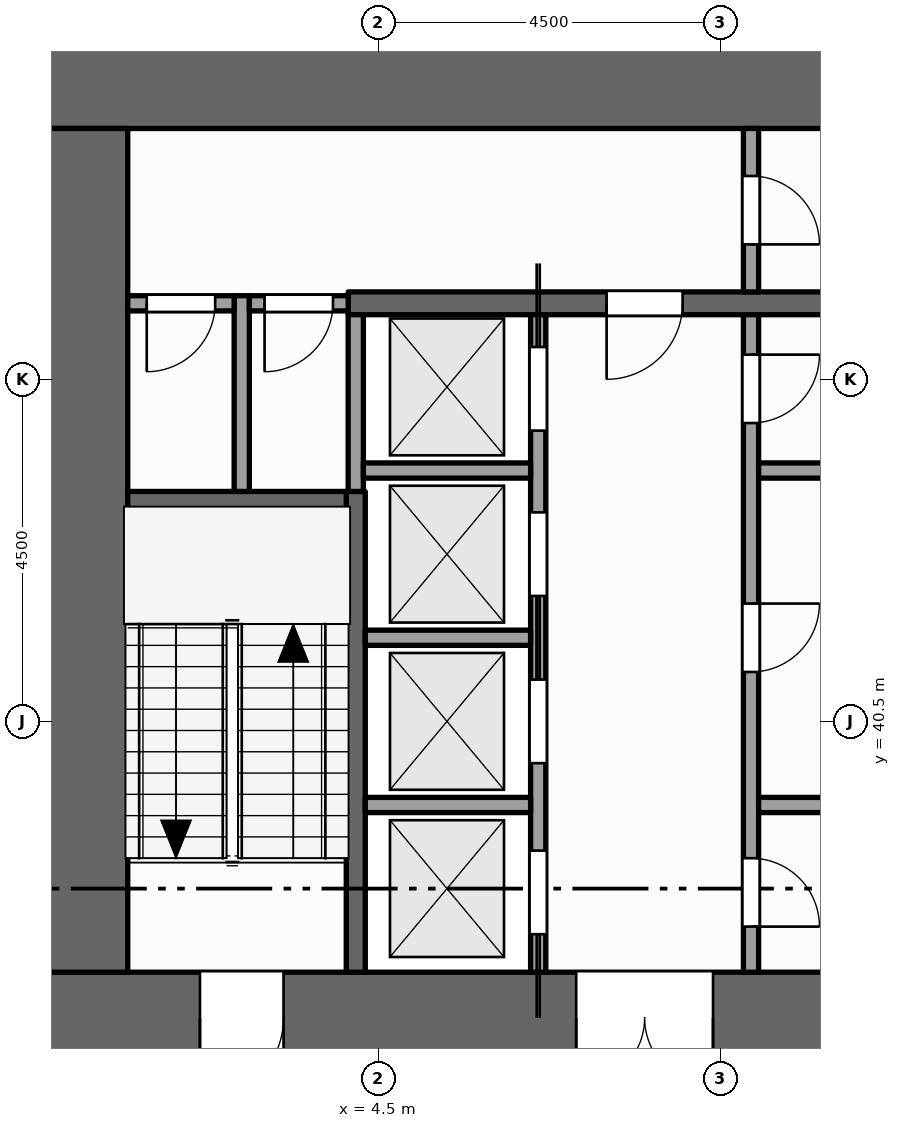
"""IFC4 building model, lengths in metres.
Left out: names, types, materials, properties, quantities, classifications, styles, units other than length and angle.
Written with IfcOpenShell. Run it as: python <this file> out.ifc"""

import sys

from ifc_helpers import new_model, si_unit, direction, frame, frame_2d, origin, place, context, subcontext, project, spatial, rectangle, extrude, element, fill, save


model = new_model("IFC4")
c1 = context("Model", 3, precision=1e-05, world=origin(), true_north=direction((0.0, 1.0)))
c2 = subcontext(c1, "Body", "Model", "MODEL_VIEW")
j1 = project(units=[si_unit("LENGTHUNIT", "METRE"), si_unit("PLANEANGLEUNIT", "RADIAN")], contexts=[c1])
p1 = place(None, origin())
s1 = spatial("IfcSite", under=j1, at=p1, CompositionType="ELEMENT")
p2 = place(p1, origin())
s2 = spatial("IfcBuilding", under=s1, at=p2, CompositionType="ELEMENT")
p3 = place(p2, frame((0.0, 0.0, 95.0)))
s3 = spatial("IfcBuildingStorey", under=s2, at=p3, CompositionType="ELEMENT", Elevation=95.0)
p4 = place(p3, frame((0.0, 36.6, -0.15), z_axis=(0.0, 0.0, 1.0), x_axis=(1.0, 0.0, 0.0)))
e1 = element("IfcWall", 1, at=p4, inside=s3, PredefinedType="SHEAR", context=c2, shape_type="SweptSolid", body=[
    extrude(rectangle(XDim=22.5, YDim=1.2, at=frame_2d((11.25, 0.0))), origin(), (0.0, 0.0, 1.0), 4.0),
])
p5 = place(p4, frame((7.1, 0.0, 0.15)))
e2 = element("IfcOpeningElement", 2, at=p5, cuts=e1, PredefinedType="OPENING", context=c2, shape_type="SweptSolid", body=[
    extrude(rectangle(XDim=1.8, YDim=2.1, at=frame_2d((0.9, 1.05))), frame((0.0, 0.61, 0.0), z_axis=(0.0, -1.0, 0.0), x_axis=(1.0, 0.0, 0.0)), (0.0, 0.0, 1.0), 1.22),
])
p6 = place(p4, frame((13.15, 0.0, 0.15)))
e3 = element("IfcOpeningElement", 3, at=p6, cuts=e1, PredefinedType="OPENING", context=c2, shape_type="SweptSolid", body=[
    extrude(rectangle(XDim=1.1, YDim=2.1, at=frame_2d((0.55, 1.05))), frame((0.0, 0.61, 0.0), z_axis=(0.0, -1.0, 0.0), x_axis=(1.0, 0.0, 0.0)), (0.0, 0.0, 1.0), 1.22),
])
p7 = place(p4, frame((2.15, 0.0, 0.15)))
e4 = element("IfcOpeningElement", 4, at=p7, cuts=e1, PredefinedType="OPENING", context=c2, shape_type="SweptSolid", body=[
    extrude(rectangle(XDim=1.1, YDim=2.1, at=frame_2d((0.55, 1.05))), frame((0.0, 0.61, 0.0), z_axis=(0.0, -1.0, 0.0), x_axis=(1.0, 0.0, 0.0)), (0.0, 0.0, 1.0), 1.22),
])
p8 = place(p4, frame((19.35, 0.0, 0.15)))
e5 = element("IfcOpeningElement", 5, at=p8, cuts=e1, PredefinedType="OPENING", context=c2, shape_type="SweptSolid", body=[
    extrude(rectangle(XDim=1.1, YDim=2.1, at=frame_2d((0.55, 1.05))), frame((0.0, 0.61, 0.0), z_axis=(0.0, -1.0, 0.0), x_axis=(1.0, 0.0, 0.0)), (0.0, 0.0, 1.0), 1.22),
])
p9 = place(p3, frame((0.0, 48.9, -0.15), z_axis=(0.0, 0.0, 1.0), x_axis=(1.0, 0.0, 0.0)))
e6 = element("IfcWall", 6, at=p9, inside=s3, PredefinedType="SHEAR", context=c2, shape_type="SweptSolid", body=[
    extrude(rectangle(XDim=22.5, YDim=1.2, at=frame_2d((11.25, 0.0))), origin(), (0.0, 0.0, 1.0), 4.0),
])
p10 = place(p3, frame((0.6, 37.2, -0.15), z_axis=(0.0, 0.0, 1.0), x_axis=(0.0, 1.0, 0.0)))
e7 = element("IfcWall", 7, at=p10, inside=s3, PredefinedType="SHEAR", context=c2, shape_type="SweptSolid", body=[
    extrude(rectangle(XDim=11.1, YDim=1.2, at=frame_2d((5.55, 0.0))), origin(), (0.0, 0.0, 1.0), 4.0),
])
p11 = place(p3, frame((2.7, 43.525, 0.0), z_axis=(0.0, 0.0, 1.0), x_axis=(0.0, 1.0, 0.0)))
e8 = element("IfcWall", 8, at=p11, inside=s3, PredefinedType="PARTITIONING", context=c2, shape_type="SweptSolid", body=[
    extrude(rectangle(XDim=2.575, YDim=0.2, at=frame_2d((1.288, 0.0))), origin(), (0.0, 0.0, 1.0), 3.85),
])
p12 = place(p3, frame((4.2, 37.2, 0.0), z_axis=(0.0, 0.0, 1.0), x_axis=(0.0, 1.0, 0.0)))
e9 = element("IfcWall", 9, at=p12, inside=s3, PredefinedType="SHEAR", context=c2, shape_type="SweptSolid", body=[
    extrude(rectangle(XDim=6.325, YDim=0.25, at=frame_2d((3.163, 0.0))), origin(), (0.0, 0.0, 1.0), 3.85),
])
p13 = place(p3, frame((4.2, 43.525, 0.0), z_axis=(0.0, 0.0, 1.0), x_axis=(0.0, 1.0, 0.0)))
e10 = element("IfcWall", 10, at=p13, inside=s3, PredefinedType="SOLIDWALL", context=c2, shape_type="SweptSolid", body=[
    extrude(rectangle(XDim=2.325, YDim=0.2, at=frame_2d((1.163, 0.0))), origin(), (0.0, 0.0, 1.0), 3.85),
])
p14 = place(p3, frame((6.6, 37.2, 0.0), z_axis=(0.0, 0.0, 1.0), x_axis=(0.0, 1.0, 0.0)))
e11 = element("IfcWall", 11, at=p14, inside=s3, PredefinedType="SOLIDWALL", context=c2, shape_type="SweptSolid", body=[
    extrude(rectangle(XDim=8.65, YDim=0.2, at=frame_2d((4.325, 0.0))), origin(), (0.0, 0.0, 1.0), 3.85),
])
p15 = place(p14, frame((0.5, 0.0, 0.012)))
e12 = element("IfcOpeningElement", 12, at=p15, cuts=e11, PredefinedType="OPENING", context=c2, shape_type="SweptSolid", body=[
    extrude(rectangle(XDim=1.1, YDim=2.1, at=frame_2d((0.55, 1.05))), frame((0.0, 0.11, 0.0), z_axis=(0.0, -1.0, 0.0), x_axis=(1.0, 0.0, 0.0)), (0.0, 0.0, 1.0), 0.22),
])
p16 = place(p14, frame((2.75, 0.0, 0.012)))
e13 = element("IfcOpeningElement", 13, at=p16, cuts=e11, PredefinedType="OPENING", context=c2, shape_type="SweptSolid", body=[
    extrude(rectangle(XDim=1.1, YDim=2.1, at=frame_2d((0.55, 1.05))), frame((0.0, 0.11, 0.0), z_axis=(0.0, -1.0, 0.0), x_axis=(1.0, 0.0, 0.0)), (0.0, 0.0, 1.0), 0.22),
])
p17 = place(p14, frame((4.95, 0.0, 0.012)))
e14 = element("IfcOpeningElement", 14, at=p17, cuts=e11, PredefinedType="OPENING", context=c2, shape_type="SweptSolid", body=[
    extrude(rectangle(XDim=1.1, YDim=2.1, at=frame_2d((0.55, 1.05))), frame((0.0, 0.11, 0.0), z_axis=(0.0, -1.0, 0.0), x_axis=(1.0, 0.0, 0.0)), (0.0, 0.0, 1.0), 0.22),
])
p18 = place(p14, frame((7.125, 0.0, 0.012)))
e15 = element("IfcOpeningElement", 15, at=p18, cuts=e11, PredefinedType="OPENING", context=c2, shape_type="SweptSolid", body=[
    extrude(rectangle(XDim=1.1, YDim=2.1, at=frame_2d((0.55, 1.05))), frame((0.0, 0.11, 0.0), z_axis=(0.0, -1.0, 0.0), x_axis=(1.0, 0.0, 0.0)), (0.0, 0.0, 1.0), 0.22),
])
p19 = place(p3, frame((9.4, 37.2, 0.0), z_axis=(0.0, 0.0, 1.0), x_axis=(0.0, 1.0, 0.0)))
e16 = element("IfcWall", 16, at=p19, inside=s3, PredefinedType="PARTITIONING", context=c2, shape_type="SweptSolid", body=[
    extrude(rectangle(XDim=8.65, YDim=0.2, at=frame_2d((4.325, 0.0))), origin(), (0.0, 0.0, 1.0), 3.85),
])
p20 = place(p19, frame((0.6, 0.0, 0.0)))
e17 = element("IfcOpeningElement", 17, at=p20, cuts=e16, PredefinedType="OPENING", context=c2, shape_type="SweptSolid", body=[
    extrude(rectangle(XDim=0.9, YDim=2.1, at=frame_2d((0.45, 1.05))), frame((0.0, 0.11, 0.0), z_axis=(0.0, -1.0, 0.0), x_axis=(1.0, 0.0, 0.0)), (0.0, 0.0, 1.0), 0.22),
])
p21 = place(p19, frame((3.95, 0.0, 0.0)))
e18 = element("IfcOpeningElement", 18, at=p21, cuts=e16, PredefinedType="OPENING", context=c2, shape_type="SweptSolid", body=[
    extrude(rectangle(XDim=0.9, YDim=2.1, at=frame_2d((0.45, 1.05))), frame((0.0, 0.11, 0.0), z_axis=(0.0, -1.0, 0.0), x_axis=(1.0, 0.0, 0.0)), (0.0, 0.0, 1.0), 0.22),
])
p22 = place(p19, frame((7.225, 0.0, 0.0)))
e19 = element("IfcOpeningElement", 19, at=p22, cuts=e16, PredefinedType="OPENING", context=c2, shape_type="SweptSolid", body=[
    extrude(rectangle(XDim=0.9, YDim=2.1, at=frame_2d((0.45, 1.05))), frame((0.0, 0.11, 0.0), z_axis=(0.0, -1.0, 0.0), x_axis=(1.0, 0.0, 0.0)), (0.0, 0.0, 1.0), 0.22),
])
p23 = place(p3, frame((9.4, 46.15, 0.0), z_axis=(0.0, 0.0, 1.0), x_axis=(0.0, 1.0, 0.0)))
e20 = element("IfcWall", 20, at=p23, inside=s3, PredefinedType="PARTITIONING", context=c2, shape_type="SweptSolid", body=[
    extrude(rectangle(XDim=2.15, YDim=0.2, at=frame_2d((1.075, 0.0))), origin(), (0.0, 0.0, 1.0), 3.85),
])
p24 = place(p23, frame((0.625, 0.0, 0.0)))
e21 = element("IfcOpeningElement", 21, at=p24, cuts=e20, PredefinedType="OPENING", context=c2, shape_type="SweptSolid", body=[
    extrude(rectangle(XDim=0.9, YDim=2.1, at=frame_2d((0.45, 1.05))), frame((0.0, 0.11, 0.0), z_axis=(0.0, -1.0, 0.0), x_axis=(1.0, 0.0, 0.0)), (0.0, 0.0, 1.0), 0.22),
])
p25 = place(p3, frame((4.325, 39.4, 0.0), z_axis=(0.0, 0.0, 1.0), x_axis=(1.0, 0.0, 0.0)))
e22 = element("IfcWall", 22, at=p25, inside=s3, PredefinedType="SOLIDWALL", context=c2, shape_type="SweptSolid", body=[
    extrude(rectangle(XDim=2.175, YDim=0.2, at=frame_2d((1.087, 0.0))), origin(), (0.0, 0.0, 1.0), 3.85),
])
p26 = place(p3, frame((9.5, 39.4, 0.0), z_axis=(0.0, 0.0, 1.0), x_axis=(1.0, 0.0, 0.0)))
e23 = element("IfcWall", 23, at=p26, inside=s3, PredefinedType="PARTITIONING", context=c2, shape_type="SweptSolid", body=[
    extrude(rectangle(XDim=2.2, YDim=0.2, at=frame_2d((1.1, 0.0))), origin(), (0.0, 0.0, 1.0), 3.85),
])
p27 = place(p3, frame((4.325, 41.6, 0.0), z_axis=(0.0, 0.0, 1.0), x_axis=(1.0, 0.0, 0.0)))
e24 = element("IfcWall", 24, at=p27, inside=s3, PredefinedType="SOLIDWALL", context=c2, shape_type="SweptSolid", body=[
    extrude(rectangle(XDim=2.175, YDim=0.2, at=frame_2d((1.087, 0.0))), origin(), (0.0, 0.0, 1.0), 3.85),
])
p28 = place(p3, frame((1.2, 43.4, 0.0), z_axis=(0.0, 0.0, 1.0), x_axis=(1.0, 0.0, 0.0)))
e25 = element("IfcWall", 25, at=p28, inside=s3, PredefinedType="SHEAR", context=c2, shape_type="SweptSolid", body=[
    extrude(rectangle(XDim=2.875, YDim=0.25, at=frame_2d((1.438, 0.0))), origin(), (0.0, 0.0, 1.0), 3.85),
])
p29 = place(p3, frame((4.3, 43.8, 0.0), z_axis=(0.0, 0.0, 1.0), x_axis=(1.0, 0.0, 0.0)))
e26 = element("IfcWall", 26, at=p29, inside=s3, PredefinedType="SOLIDWALL", context=c2, shape_type="SweptSolid", body=[
    extrude(rectangle(XDim=2.2, YDim=0.2, at=frame_2d((1.1, 0.0))), origin(), (0.0, 0.0, 1.0), 3.85),
])
p30 = place(p3, frame((9.5, 43.8, 0.0), z_axis=(0.0, 0.0, 1.0), x_axis=(1.0, 0.0, 0.0)))
e27 = element("IfcWall", 27, at=p30, inside=s3, PredefinedType="PARTITIONING", context=c2, shape_type="SweptSolid", body=[
    extrude(rectangle(XDim=2.2, YDim=0.2, at=frame_2d((1.1, 0.0))), origin(), (0.0, 0.0, 1.0), 3.85),
])
p31 = place(p3, frame((1.2, 46.0, 0.0), z_axis=(0.0, 0.0, 1.0), x_axis=(1.0, 0.0, 0.0)))
e28 = element("IfcWall", 28, at=p31, inside=s3, PredefinedType="PARTITIONING", context=c2, shape_type="SweptSolid", body=[
    extrude(rectangle(XDim=1.4, YDim=0.2, at=frame_2d((0.7, 0.0))), origin(), (0.0, 0.0, 1.0), 3.85),
])
p32 = place(p31, frame((0.25, 0.0, 0.0)))
e29 = element("IfcOpeningElement", 29, at=p32, cuts=e28, PredefinedType="OPENING", context=c2, shape_type="SweptSolid", body=[
    extrude(rectangle(XDim=0.9, YDim=2.1, at=frame_2d((0.45, 1.05))), frame((0.0, 0.11, 0.0), z_axis=(0.0, -1.0, 0.0), x_axis=(1.0, 0.0, 0.0)), (0.0, 0.0, 1.0), 0.22),
])
p33 = place(p3, frame((2.8, 46.0, 0.0), z_axis=(0.0, 0.0, 1.0), x_axis=(1.0, 0.0, 0.0)))
e30 = element("IfcWall", 30, at=p33, inside=s3, PredefinedType="PARTITIONING", context=c2, shape_type="SweptSolid", body=[
    extrude(rectangle(XDim=1.3, YDim=0.2, at=frame_2d((0.65, 0.0))), origin(), (0.0, 0.0, 1.0), 3.85),
])
p34 = place(p33, frame((0.2, 0.0, 0.0)))
e31 = element("IfcOpeningElement", 31, at=p34, cuts=e30, PredefinedType="OPENING", context=c2, shape_type="SweptSolid", body=[
    extrude(rectangle(XDim=0.9, YDim=2.1, at=frame_2d((0.45, 1.05))), frame((0.0, 0.11, 0.0), z_axis=(0.0, -1.0, 0.0), x_axis=(1.0, 0.0, 0.0)), (0.0, 0.0, 1.0), 0.22),
])
p35 = place(p3, frame((4.1, 46.0, 0.0), z_axis=(0.0, 0.0, 1.0), x_axis=(1.0, 0.0, 0.0)))
e32 = element("IfcWall", 32, at=p35, inside=s3, PredefinedType="SHEAR", context=c2, shape_type="SweptSolid", body=[
    extrude(rectangle(XDim=14.5, YDim=0.3, at=frame_2d((7.25, 0.0))), origin(), (0.0, 0.0, 1.0), 3.85),
])
p36 = place(p35, frame((3.4, 0.0, 0.0)))
e33 = element("IfcOpeningElement", 33, at=p36, cuts=e32, PredefinedType="OPENING", context=c2, shape_type="SweptSolid", body=[
    extrude(rectangle(XDim=1.0, YDim=2.1, at=frame_2d((0.5, 1.05))), frame((0.0, 0.16, 0.0), z_axis=(0.0, -1.0, 0.0), x_axis=(1.0, 0.0, 0.0)), (0.0, 0.0, 1.0), 0.32),
])
p37 = place(p35, frame((9.1, 0.0, 0.0)))
e34 = element("IfcOpeningElement", 34, at=p37, cuts=e32, PredefinedType="OPENING", context=c2, shape_type="SweptSolid", body=[
    extrude(rectangle(XDim=1.0, YDim=2.1, at=frame_2d((0.5, 1.05))), frame((0.0, 0.16, 0.0), z_axis=(0.0, -1.0, 0.0), x_axis=(1.0, 0.0, 0.0)), (0.0, 0.0, 1.0), 0.32),
])
p38 = place(p15, origin())
e35 = element("IfcDoor", 35, at=p38, inside=s3, OperationType="SLIDING_TO_LEFT", PredefinedType="DOOR", context=c2, shape_type="SweptSolid", body=[
    extrude(rectangle(XDim=1.1, YDim=2.1, at=frame_2d((0.55, 1.05))), frame((0.0, 0.025, 0.0), z_axis=(0.0, -1.0, 0.0), x_axis=(1.0, 0.0, 0.0)), (0.0, 0.0, 1.0), 0.05),
])
fill(e12, e35)
p39 = place(p16, origin())
e36 = element("IfcDoor", 36, at=p39, inside=s3, OperationType="SLIDING_TO_RIGHT", PredefinedType="DOOR", context=c2, shape_type="SweptSolid", body=[
    extrude(rectangle(XDim=1.1, YDim=2.1, at=frame_2d((0.55, 1.05))), frame((0.0, 0.025, 0.0), z_axis=(0.0, -1.0, 0.0), x_axis=(1.0, 0.0, 0.0)), (0.0, 0.0, 1.0), 0.05),
])
fill(e13, e36)
p40 = place(p17, origin())
e37 = element("IfcDoor", 37, at=p40, inside=s3, OperationType="SLIDING_TO_LEFT", PredefinedType="DOOR", context=c2, shape_type="SweptSolid", body=[
    extrude(rectangle(XDim=1.1, YDim=2.1, at=frame_2d((0.55, 1.05))), frame((0.0, 0.025, 0.0), z_axis=(0.0, -1.0, 0.0), x_axis=(1.0, 0.0, 0.0)), (0.0, 0.0, 1.0), 0.05),
])
fill(e14, e37)
p41 = place(p18, origin())
e38 = element("IfcDoor", 38, at=p41, inside=s3, OperationType="SLIDING_TO_RIGHT", PredefinedType="DOOR", context=c2, shape_type="SweptSolid", body=[
    extrude(rectangle(XDim=1.1, YDim=2.1, at=frame_2d((0.55, 1.05))), frame((0.0, 0.025, 0.0), z_axis=(0.0, -1.0, 0.0), x_axis=(1.0, 0.0, 0.0)), (0.0, 0.0, 1.0), 0.05),
])
fill(e15, e38)
p42 = place(p5, origin())
e39 = element("IfcDoor", 39, at=p42, inside=s3, OperationType="DOUBLE_DOOR_SINGLE_SWING", PredefinedType="DOOR", context=c2, shape_type="SweptSolid", body=[
    extrude(rectangle(XDim=1.8, YDim=2.1, at=frame_2d((0.9, 1.05))), frame((0.0, 0.025, 0.0), z_axis=(0.0, -1.0, 0.0), x_axis=(1.0, 0.0, 0.0)), (0.0, 0.0, 1.0), 0.05),
])
fill(e2, e39)
p43 = place(p36, origin())
e40 = element("IfcDoor", 40, at=p43, inside=s3, OperationType="SINGLE_SWING_LEFT", PredefinedType="DOOR", context=c2, shape_type="SweptSolid", body=[
    extrude(rectangle(XDim=1.0, YDim=2.1, at=frame_2d((0.5, 1.05))), frame((0.0, 0.025, 0.0), z_axis=(0.0, -1.0, 0.0), x_axis=(1.0, 0.0, 0.0)), (0.0, 0.0, 1.0), 0.05),
])
fill(e33, e40)
p44 = place(p24, origin())
e41 = element("IfcDoor", 41, at=p44, inside=s3, OperationType="SINGLE_SWING_LEFT", PredefinedType="DOOR", context=c2, shape_type="SweptSolid", body=[
    extrude(rectangle(XDim=0.9, YDim=2.1, at=frame_2d((0.45, 1.05))), frame((0.0, 0.025, 0.0), z_axis=(0.0, -1.0, 0.0), x_axis=(1.0, 0.0, 0.0)), (0.0, 0.0, 1.0), 0.05),
])
fill(e21, e41)
p45 = place(p7, origin())
e42 = element("IfcDoor", 42, at=p45, inside=s3, OperationType="SINGLE_SWING_LEFT", PredefinedType="DOOR", context=c2, shape_type="SweptSolid", body=[
    extrude(rectangle(XDim=1.1, YDim=2.1, at=frame_2d((0.55, 1.05))), frame((0.0, 0.025, 0.0), z_axis=(0.0, -1.0, 0.0), x_axis=(1.0, 0.0, 0.0)), (0.0, 0.0, 1.0), 0.05),
])
fill(e4, e42)
p46 = place(p32, origin())
e43 = element("IfcDoor", 43, at=p46, inside=s3, OperationType="SINGLE_SWING_LEFT", PredefinedType="DOOR", context=c2, shape_type="SweptSolid", body=[
    extrude(rectangle(XDim=0.9, YDim=2.1, at=frame_2d((0.45, 1.05))), frame((0.0, 0.025, 0.0), z_axis=(0.0, -1.0, 0.0), x_axis=(1.0, 0.0, 0.0)), (0.0, 0.0, 1.0), 0.05),
])
fill(e29, e43)
p47 = place(p34, origin())
e44 = element("IfcDoor", 44, at=p47, inside=s3, OperationType="SINGLE_SWING_LEFT", PredefinedType="DOOR", context=c2, shape_type="SweptSolid", body=[
    extrude(rectangle(XDim=0.9, YDim=2.1, at=frame_2d((0.45, 1.05))), frame((0.0, 0.025, 0.0), z_axis=(0.0, -1.0, 0.0), x_axis=(1.0, 0.0, 0.0)), (0.0, 0.0, 1.0), 0.05),
])
fill(e31, e44)
p48 = place(p20, origin())
e45 = element("IfcDoor", 45, at=p48, inside=s3, OperationType="SINGLE_SWING_LEFT", PredefinedType="DOOR", context=c2, shape_type="SweptSolid", body=[
    extrude(rectangle(XDim=0.9, YDim=2.1, at=frame_2d((0.45, 1.05))), frame((0.0, 0.025, 0.0), z_axis=(0.0, -1.0, 0.0), x_axis=(1.0, 0.0, 0.0)), (0.0, 0.0, 1.0), 0.05),
])
fill(e17, e45)
p49 = place(p21, origin())
e46 = element("IfcDoor", 46, at=p49, inside=s3, OperationType="SINGLE_SWING_RIGHT", PredefinedType="DOOR", context=c2, shape_type="SweptSolid", body=[
    extrude(rectangle(XDim=0.9, YDim=2.1, at=frame_2d((0.45, 1.05))), frame((0.0, 0.025, 0.0), z_axis=(0.0, -1.0, 0.0), x_axis=(1.0, 0.0, 0.0)), (0.0, 0.0, 1.0), 0.05),
])
fill(e18, e46)
p50 = place(p22, origin())
e47 = element("IfcDoor", 47, at=p50, inside=s3, OperationType="SINGLE_SWING_RIGHT", PredefinedType="DOOR", context=c2, shape_type="SweptSolid", body=[
    extrude(rectangle(XDim=0.9, YDim=2.1, at=frame_2d((0.45, 1.05))), frame((0.0, 0.025, 0.0), z_axis=(0.0, -1.0, 0.0), x_axis=(1.0, 0.0, 0.0)), (0.0, 0.0, 1.0), 0.05),
])
fill(e19, e47)
save(model, sys.argv[1])
